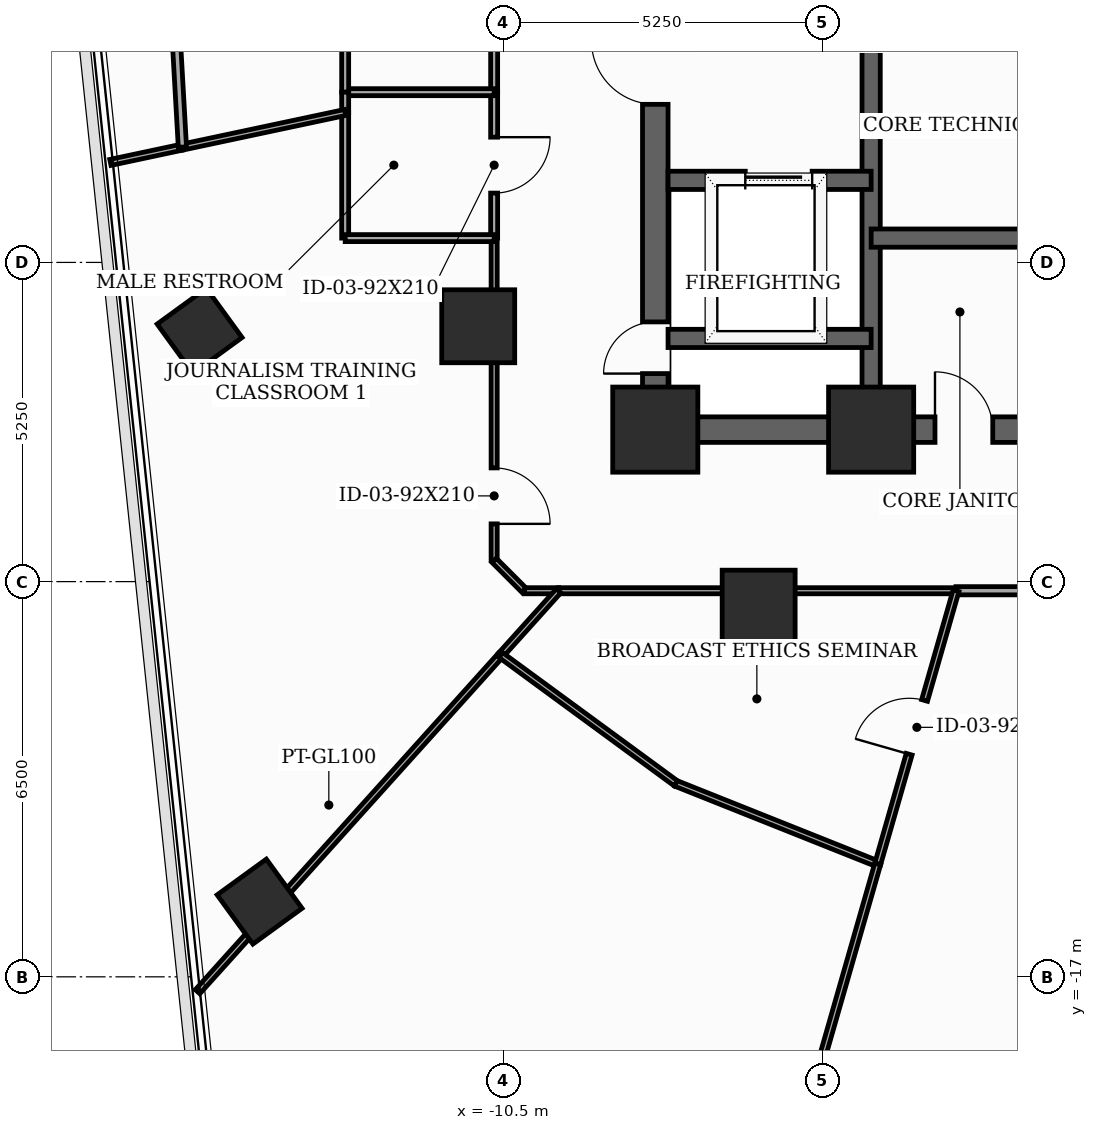
"""IFC4 building model, lengths in metres.
Left out: names, types, materials, properties, quantities, classifications, styles, units other than length and angle.
Written with IfcOpenShell. Run it as: python <this file> out.ifc"""

import sys

from ifc_helpers import new_model, si_unit, direction, frame, frame_2d, origin, origin_2d, place, context, subcontext, project, spatial, rectangle, extrude, element, fill, save


model = new_model("IFC4")
c1 = context("Model", 3, precision=1e-05, world=origin(), true_north=direction((0.0, 1.0)))
c2 = subcontext(c1, "Body", "Model", "MODEL_VIEW")
j1 = project(units=[si_unit("LENGTHUNIT", "METRE"), si_unit("PLANEANGLEUNIT", "RADIAN")], contexts=[c1])
p1 = place(None, origin())
s1 = spatial("IfcSite", under=j1, at=p1, CompositionType="ELEMENT")
p2 = place(p1, origin())
s2 = spatial("IfcBuilding", under=s1, at=p2, CompositionType="ELEMENT")
p3 = place(p2, frame((0.0, 0.0, 173.1)))
s3 = spatial("IfcBuildingStorey", under=s2, at=p3, CompositionType="ELEMENT", Elevation=173.1)
for number, where, z_axis, x_axis in (
    (1, (-8.0, -8.0, 0.0), (0.0, 0.0, 1.0), (1.0, 0.0, 0.0)),
    (2, (-4.45, -8.0, 0.0), (0.0, 0.0, 1.0), (1.0, 0.0, 0.0)),
):
    element("IfcColumn", number, at=place(p3, frame(where, z_axis=z_axis, x_axis=x_axis)), inside=s3, PredefinedType="COLUMN", context=c2, shape_type="SweptSolid", body=[
        extrude(rectangle(XDim=1.4, YDim=1.4, at=origin_2d()), origin(), (0.0, 0.0, 1.0), 3.7),
    ])
for number, where, z_axis, x_axis in (
    (3, (-10.912, -6.3, 0.0), (0.0, 0.0, 1.0), (1.0, 0.0, 0.0)),
    (4, (-6.3, -10.912, 0.0), (0.0, 0.0, 1.0), (1.0, 0.0, 0.0)),
):
    element("IfcColumn", number, at=place(p3, frame(where, z_axis=z_axis, x_axis=x_axis)), inside=s3, PredefinedType="COLUMN", context=c2, shape_type="SweptSolid", body=[
        extrude(rectangle(XDim=1.2, YDim=1.2, at=origin_2d()), origin(), (0.0, 0.0, 1.0), 3.7),
    ])
for number, where, z_axis, x_axis in (
    (5, (-15.494, -6.375, 0.0), (0.0, 0.0, 1.0), (0.809, 0.588, 0.0)),
    (6, (-14.507, -15.763, 0.0), (0.0, 0.0, 1.0), (0.809, 0.588, 0.0)),
):
    element("IfcColumn", number, at=place(p3, frame(where, z_axis=z_axis, x_axis=x_axis)), inside=s3, PredefinedType="COLUMN", context=c2, shape_type="SweptSolid", body=[
        extrude(rectangle(XDim=1.0, YDim=1.0, at=origin_2d()), origin(), (0.0, 0.0, 1.0), 3.7),
    ])
p4 = place(p3, frame((-8.0, -8.0, 0.0), z_axis=(0.0, 0.0, 1.0), x_axis=(0.0, 1.0, 0.0)))
e7 = element("IfcWall", 7, at=p4, inside=s3, PredefinedType="SHEAR", context=c2, shape_type="SweptSolid", body=[
    extrude(rectangle(XDim=16.0, YDim=0.42, at=frame_2d((8.0, 0.0))), origin(), (0.0, 0.0, 1.0), 3.5),
])
p5 = place(p4, frame((0.922, 0.0, 0.0)))
e8 = element("IfcOpeningElement", 8, at=p5, cuts=e7, PredefinedType="OPENING", context=c2, shape_type="SweptSolid", body=[
    extrude(rectangle(XDim=0.85, YDim=2.02, at=frame_2d((0.425, 1.01))), frame((0.0, 0.22, 0.0), z_axis=(0.0, -1.0, 0.0), x_axis=(1.0, 0.0, 0.0)), (0.0, 0.0, 1.0), 0.44),
])
p6 = place(p4, frame((5.35, 0.0, 0.0)))
e9 = element("IfcOpeningElement", 9, at=p6, cuts=e7, PredefinedType="OPENING", context=c2, shape_type="SweptSolid", body=[
    extrude(rectangle(XDim=1.05, YDim=2.15, at=frame_2d((0.525, 1.075))), frame((0.0, 0.22, 0.0), z_axis=(0.0, -1.0, 0.0), x_axis=(1.0, 0.0, 0.0)), (0.0, 0.0, 1.0), 0.44),
])
p7 = place(p3, frame((-8.0, -8.0, 0.0), z_axis=(0.0, 0.0, 1.0), x_axis=(1.0, 0.0, 0.0)))
e10 = element("IfcWall", 10, at=p7, inside=s3, PredefinedType="SHEAR", context=c2, shape_type="SweptSolid", body=[
    extrude(rectangle(XDim=16.0, YDim=0.42, at=frame_2d((8.0, 0.0))), origin(), (0.0, 0.0, 1.0), 3.5),
])
p8 = place(p7, frame((4.6, 0.0, 0.0)))
e11 = element("IfcOpeningElement", 11, at=p8, cuts=e10, PredefinedType="OPENING", context=c2, shape_type="SweptSolid", body=[
    extrude(rectangle(XDim=0.95, YDim=2.1, at=frame_2d((0.475, 1.05))), frame((0.0, 0.22, 0.0), z_axis=(0.0, -1.0, 0.0), x_axis=(1.0, 0.0, 0.0)), (0.0, 0.0, 1.0), 0.44),
])
p9 = place(p7, frame((7.52, 0.0, 0.0)))
e12 = element("IfcOpeningElement", 12, at=p9, cuts=e10, PredefinedType="OPENING", context=c2, shape_type="SweptSolid", body=[
    extrude(rectangle(XDim=0.95, YDim=2.1, at=frame_2d((0.475, 1.05))), frame((0.0, 0.22, 0.0), z_axis=(0.0, -1.0, 0.0), x_axis=(1.0, 0.0, 0.0)), (0.0, 0.0, 1.0), 0.44),
])
p10 = place(p7, frame((10.45, 0.0, 0.0)))
e13 = element("IfcOpeningElement", 13, at=p10, cuts=e10, PredefinedType="OPENING", context=c2, shape_type="SweptSolid", body=[
    extrude(rectangle(XDim=0.95, YDim=2.1, at=frame_2d((0.475, 1.05))), frame((0.0, 0.22, 0.0), z_axis=(0.0, -1.0, 0.0), x_axis=(1.0, 0.0, 0.0)), (0.0, 0.0, 1.0), 0.44),
])
p11 = place(p3, frame((-4.45, -7.79, 0.0), z_axis=(0.0, 0.0, 1.0), x_axis=(0.0, 1.0, 0.0)))
e14 = element("IfcWall", 14, at=p11, inside=s3, PredefinedType="SHEAR", context=c2, shape_type="SweptSolid", body=[
    extrude(rectangle(XDim=15.58, YDim=0.3, at=frame_2d((7.79, 0.0))), origin(), (0.0, 0.0, 1.0), 3.5),
])
p12 = place(p3, frame((-7.79, -3.9, 0.0), z_axis=(0.0, 0.0, 1.0), x_axis=(1.0, 0.0, 0.0)))
e15 = element("IfcWall", 15, at=p12, inside=s3, PredefinedType="SHEAR", context=c2, shape_type="SweptSolid", body=[
    extrude(rectangle(XDim=3.34, YDim=0.3, at=frame_2d((1.67, 0.0))), origin(), (0.0, 0.0, 1.0), 3.5),
])
p13 = place(p12, frame((1.27, 0.0, 0.0)))
e16 = element("IfcOpeningElement", 16, at=p13, cuts=e15, PredefinedType="OPENING", context=c2, shape_type="SweptSolid", body=[
    extrude(rectangle(XDim=1.1, YDim=2.1, at=frame_2d((0.55, 1.05))), frame((0.0, 0.16, 0.0), z_axis=(0.0, -1.0, 0.0), x_axis=(1.0, 0.0, 0.0)), (0.0, 0.0, 1.0), 0.32),
])
p14 = place(p3, frame((-7.79, -6.5, 0.0), z_axis=(0.0, 0.0, 1.0), x_axis=(1.0, 0.0, 0.0)))
e17 = element("IfcWall", 17, at=p14, inside=s3, PredefinedType="SHEAR", context=c2, shape_type="SweptSolid", body=[
    extrude(rectangle(XDim=3.34, YDim=0.3, at=frame_2d((1.67, 0.0))), origin(), (0.0, 0.0, 1.0), 3.5),
])
p15 = place(p3, frame((-4.45, -4.85, 0.0), z_axis=(0.0, 0.0, 1.0), x_axis=(1.0, 0.0, 0.0)))
e18 = element("IfcWall", 18, at=p15, inside=s3, PredefinedType="SHEAR", context=c2, shape_type="SweptSolid", body=[
    extrude(rectangle(XDim=8.9, YDim=0.3, at=frame_2d((4.45, 0.0))), origin(), (0.0, 0.0, 1.0), 3.5),
])
p16 = place(p3, frame((-10.65, 0.0, 0.0), z_axis=(0.0, 0.0, 1.0), x_axis=(0.0, -1.0, 0.0)))
e19 = element("IfcWall", 19, at=p16, inside=s3, PredefinedType="PARTITIONING", context=c2, shape_type="SweptSolid", body=[
    extrude(rectangle(XDim=2.45, YDim=0.115, at=frame_2d((1.225, 0.0))), origin(), (0.0, 0.0, 1.0), 2.885),
])
p17 = place(p16, frame((0.765, 0.0, 0.0)))
e20 = element("IfcOpeningElement", 20, at=p17, cuts=e19, PredefinedType="OPENING", context=c2, shape_type="SweptSolid", body=[
    extrude(rectangle(XDim=0.92, YDim=2.1, at=frame_2d((0.46, 1.05))), frame((0.0, 0.067, 0.0), z_axis=(0.0, -1.0, 0.0), x_axis=(1.0, 0.0, 0.0)), (0.0, 0.0, 1.0), 0.135),
])
p18 = place(p3, frame((-10.65, -2.45, 0.0), z_axis=(0.0, 0.0, 1.0), x_axis=(0.0, -1.0, 0.0)))
e21 = element("IfcWall", 21, at=p18, inside=s3, PredefinedType="PARTITIONING", context=c2, shape_type="SweptSolid", body=[
    extrude(rectangle(XDim=2.4, YDim=0.115, at=frame_2d((1.2, 0.0))), origin(), (0.0, 0.0, 1.0), 3.5),
])
p19 = place(p18, frame((0.74, 0.0, 0.0)))
e22 = element("IfcOpeningElement", 22, at=p19, cuts=e21, PredefinedType="OPENING", context=c2, shape_type="SweptSolid", body=[
    extrude(rectangle(XDim=0.92, YDim=2.1, at=frame_2d((0.46, 1.05))), frame((0.0, 0.067, 0.0), z_axis=(0.0, -1.0, 0.0), x_axis=(1.0, 0.0, 0.0)), (0.0, 0.0, 1.0), 0.135),
])
p20 = place(p3, frame((-10.65, -4.85, 0.0), z_axis=(0.0, 0.0, 1.0), x_axis=(0.0, -1.0, 0.0)))
e23 = element("IfcWall", 23, at=p20, inside=s3, PredefinedType="MOVABLE", context=c2, shape_type="SweptSolid", body=[
    extrude(rectangle(XDim=5.3, YDim=0.1, at=frame_2d((2.65, 0.0))), origin(), (0.0, 0.0, 1.0), 2.885),
])
p21 = place(p20, frame((3.78, 0.0, 0.0)))
e24 = element("IfcOpeningElement", 24, at=p21, cuts=e23, PredefinedType="OPENING", context=c2, shape_type="SweptSolid", body=[
    extrude(rectangle(XDim=0.92, YDim=2.1, at=frame_2d((0.46, 1.05))), frame((0.0, 0.06, 0.0), z_axis=(0.0, -1.0, 0.0), x_axis=(1.0, 0.0, 0.0)), (0.0, 0.0, 1.0), 0.12),
])
p22 = place(p3, frame((-10.65, -10.15, 0.0), z_axis=(0.0, 0.0, 1.0), x_axis=(0.707106781187, -0.707106781187, 0.0)))
e25 = element("IfcWall", 25, at=p22, inside=s3, PredefinedType="MOVABLE", context=c2, shape_type="SweptSolid", body=[
    extrude(rectangle(XDim=0.707, YDim=0.1, at=frame_2d((0.354, 0.0))), origin(), (0.0, 0.0, 1.0), 3.5),
])
p23 = place(p3, frame((-10.15, -10.65, 0.0), z_axis=(0.0, 0.0, 1.0), x_axis=(1.0, 0.0, 0.0)))
e26 = element("IfcWall", 26, at=p23, inside=s3, PredefinedType="MOVABLE", context=c2, shape_type="SweptSolid", body=[
    extrude(rectangle(XDim=0.561, YDim=0.1, at=frame_2d((0.28, 0.0))), origin(), (0.0, 0.0, 1.0), 3.5),
])
p24 = place(p3, frame((-9.589, -10.65, 0.0), z_axis=(0.0, 0.0, 1.0), x_axis=(1.0, 0.0, 0.0)))
e27 = element("IfcWall", 27, at=p24, inside=s3, PredefinedType="MOVABLE", context=c2, shape_type="SweptSolid", body=[
    extrude(rectangle(XDim=6.535, YDim=0.1, at=frame_2d((3.268, 0.0))), origin(), (0.0, 0.0, 1.0), 2.885),
])
p25 = place(p3, frame((-3.054, -10.65, 0.0), z_axis=(0.0, 0.0, 1.0), x_axis=(1.0, 0.0, 0.0)))
e28 = element("IfcWall", 28, at=p25, inside=s3, PredefinedType="PARTITIONING", context=c2, shape_type="SweptSolid", body=[
    extrude(rectangle(XDim=10.792, YDim=0.135, at=frame_2d((5.396, 0.0))), origin(), (0.0, 0.0, 1.0), 2.885),
])
p26 = place(p25, frame((4.596, 0.0, 0.0)))
e29 = element("IfcOpeningElement", 29, at=p26, cuts=e28, PredefinedType="OPENING", context=c2, shape_type="SweptSolid", body=[
    extrude(rectangle(XDim=1.6, YDim=2.15, at=frame_2d((0.8, 1.075))), frame((0.0, 0.077, 0.0), z_axis=(0.0, -1.0, 0.0), x_axis=(1.0, 0.0, 0.0)), (0.0, 0.0, 1.0), 0.155),
])
p27 = place(p3, frame((-13.1, -2.45, 0.0), z_axis=(0.0, 0.0, 1.0), x_axis=(1.0, 0.0, 0.0)))
e30 = element("IfcWall", 30, at=p27, inside=s3, PredefinedType="PARTITIONING", context=c2, shape_type="SweptSolid", body=[
    extrude(rectangle(XDim=2.45, YDim=0.115, at=frame_2d((1.225, 0.0))), origin(), (0.0, 0.0, 1.0), 2.885),
])
p28 = place(p3, frame((-13.1, 0.0, 0.0), z_axis=(0.0, 0.0, 1.0), x_axis=(0.0, -1.0, 0.0)))
e31 = element("IfcWall", 31, at=p28, inside=s3, PredefinedType="PARTITIONING", context=c2, shape_type="SweptSolid", body=[
    extrude(rectangle(XDim=2.45, YDim=0.115, at=frame_2d((1.225, 0.0))), origin(), (0.0, 0.0, 1.0), 3.5),
])
p29 = place(p3, frame((-13.1, -2.784, 0.0), z_axis=(0.0, 0.0, 1.0), x_axis=(0.0, -1.0, 0.0)))
e32 = element("IfcWall", 32, at=p29, inside=s3, PredefinedType="PARTITIONING", context=c2, shape_type="SweptSolid", body=[
    extrude(rectangle(XDim=2.066, YDim=0.115, at=frame_2d((1.033, 0.0))), origin(), (0.0, 0.0, 1.0), 3.5),
])
p30 = place(p3, frame((-13.1, -4.85, 0.0), z_axis=(0.0, 0.0, 1.0), x_axis=(1.0, 0.0, 0.0)))
e33 = element("IfcWall", 33, at=p30, inside=s3, PredefinedType="PARTITIONING", context=c2, shape_type="SweptSolid", body=[
    extrude(rectangle(XDim=2.45, YDim=0.115, at=frame_2d((1.225, 0.0))), origin(), (0.0, 0.0, 1.0), 2.885),
])
p31 = place(p3, frame((-13.1, -2.45, 0.0), z_axis=(0.0, 0.0, 1.0), x_axis=(0.0, -1.0, 0.0)))
e34 = element("IfcWall", 34, at=p31, inside=s3, PredefinedType="PARTITIONING", context=c2, shape_type="SweptSolid", body=[
    extrude(rectangle(XDim=0.334, YDim=0.115, at=frame_2d((0.167, 0.0))), origin(), (0.0, 0.0, 1.0), 3.5),
])
p32 = place(p3, frame((-10.541, -11.707, 0.0), z_axis=(0.0, 0.0, 1.0), x_axis=(0.669154347467, 0.743123448201, 0.0)))
e35 = element("IfcWall", 35, at=p32, inside=s3, PredefinedType="MOVABLE", context=c2, shape_type="SweptSolid", body=[
    extrude(rectangle(XDim=1.423, YDim=0.1, at=frame_2d((0.711, 0.0))), origin(), (0.0, 0.0, 1.0), 3.5),
])
p33 = place(p3, frame((-15.528, -17.245, 0.0), z_axis=(0.0, 0.0, 1.0), x_axis=(0.669169234172, 0.74311004302, 0.0)))
e36 = element("IfcWall", 36, at=p33, inside=s3, PredefinedType="MOVABLE", context=c2, shape_type="SweptSolid", body=[
    extrude(rectangle(XDim=7.452, YDim=0.1, at=frame_2d((3.726, 0.0))), origin(), (0.0, 0.0, 1.0), 2.885),
])
p34 = place(p3, frame((-15.777, -3.353, 0.0), z_axis=(0.0, 0.0, 1.0), x_axis=(-0.978029023755, -0.208468771503, 0.0)))
e37 = element("IfcWall", 37, at=p34, inside=s3, PredefinedType="MOVABLE", context=c2, shape_type="SweptSolid", body=[
    extrude(rectangle(XDim=1.211, YDim=0.1, at=frame_2d((0.605, 0.0))), origin(), (0.0, 0.0, 1.0), 2.985),
])
p35 = place(p3, frame((-13.1, -2.784, 0.0), z_axis=(0.0, 0.0, 1.0), x_axis=(-0.978141843994, -0.207938772307, 0.0)))
e38 = element("IfcWall", 38, at=p35, inside=s3, PredefinedType="MOVABLE", context=c2, shape_type="SweptSolid", body=[
    extrude(rectangle(XDim=2.737, YDim=0.1, at=frame_2d((1.368, 0.0))), origin(), (0.0, 0.0, 1.0), 2.985),
])
p36 = place(p3, frame((-10.541, -11.707, 0.0), z_axis=(0.0, 0.0, 1.0), x_axis=(0.806504929698, -0.591227366055, 0.0)))
e39 = element("IfcWall", 39, at=p36, inside=s3, PredefinedType="MOVABLE", context=c2, shape_type="SweptSolid", body=[
    extrude(rectangle(XDim=3.572, YDim=0.1, at=frame_2d((1.786, 0.0))), origin(), (0.0, 0.0, 1.0), 2.885),
])
p37 = place(p3, frame((-7.66, -13.819, 0.0), z_axis=(0.0, 0.0, 1.0), x_axis=(0.928782740603, -0.37062463593, 0.0)))
e40 = element("IfcWall", 40, at=p37, inside=s3, PredefinedType="MOVABLE", context=c2, shape_type="SweptSolid", body=[
    extrude(rectangle(XDim=3.572, YDim=0.1, at=frame_2d((1.786, 0.0))), origin(), (0.0, 0.0, 1.0), 3.5),
])
p38 = place(p3, frame((-4.342, -15.143, 0.0), z_axis=(0.0, 0.0, 1.0), x_axis=(0.275576442642, 0.961279160422, 0.0)))
e41 = element("IfcWall", 41, at=p38, inside=s3, PredefinedType="MOVABLE", context=c2, shape_type="SweptSolid", body=[
    extrude(rectangle(XDim=4.674, YDim=0.1, at=frame_2d((2.337, 0.0))), origin(), (0.0, 0.0, 1.0), 2.885),
])
p39 = place(p38, frame((1.877, 0.0, 0.0)))
e42 = element("IfcOpeningElement", 42, at=p39, cuts=e41, PredefinedType="OPENING", context=c2, shape_type="SweptSolid", body=[
    extrude(rectangle(XDim=0.92, YDim=2.1, at=frame_2d((0.46, 1.05))), frame((0.0, 0.06, 0.0), z_axis=(0.0, -1.0, 0.0), x_axis=(1.0, 0.0, 0.0)), (0.0, 0.0, 1.0), 0.12),
])
p40 = place(p3, frame((-7.721, -26.926, 0.0), z_axis=(0.0, 0.0, 1.0), x_axis=(0.275633812082, 0.961262712081, 0.0)))
e43 = element("IfcWall", 43, at=p40, inside=s3, PredefinedType="MOVABLE", context=c2, shape_type="SweptSolid", body=[
    extrude(rectangle(XDim=12.258, YDim=0.1, at=frame_2d((6.129, 0.0))), origin(), (0.0, 0.0, 1.0), 2.985),
])
p41 = place(p40, frame((5.669, 0.0, 0.0)))
e44 = element("IfcOpeningElement", 44, at=p41, cuts=e43, PredefinedType="OPENING", context=c2, shape_type="SweptSolid", body=[
    extrude(rectangle(XDim=0.92, YDim=2.1, at=frame_2d((0.46, 1.05))), frame((0.0, 0.06, 0.0), z_axis=(0.0, -1.0, 0.0), x_axis=(1.0, 0.0, 0.0)), (0.0, 0.0, 1.0), 0.12),
])
p42 = place(p3, frame((-15.777, -3.353, 0.0), z_axis=(0.0, 0.0, 1.0), x_axis=(-0.056600228811, 0.99839692212, 0.0)))
e45 = element("IfcWall", 45, at=p42, inside=s3, PredefinedType="PARTITIONING", context=c2, shape_type="SweptSolid", body=[
    extrude(rectangle(XDim=5.336, YDim=0.135, at=frame_2d((2.668, 0.0))), origin(), (0.0, 0.0, 1.0), 2.985),
])
p43 = place(p5, origin())
e46 = element("IfcDoor", 46, at=p43, inside=s3, OperationType="SINGLE_SWING_LEFT", PredefinedType="TRAPDOOR", context=c2, shape_type="SweptSolid", body=[
    extrude(rectangle(XDim=0.85, YDim=2.02, at=frame_2d((0.425, 1.01))), frame((0.0, 0.025, 0.0), z_axis=(0.0, -1.0, 0.0), x_axis=(1.0, 0.0, 0.0)), (0.0, 0.0, 1.0), 0.05),
])
fill(e8, e46)
p44 = place(p6, origin())
e47 = element("IfcDoor", 47, at=p44, inside=s3, OperationType="SINGLE_SWING_RIGHT", PredefinedType="DOOR", context=c2, shape_type="SweptSolid", body=[
    extrude(rectangle(XDim=1.05, YDim=2.15, at=frame_2d((0.525, 1.075))), frame((0.0, 0.025, 0.0), z_axis=(0.0, -1.0, 0.0), x_axis=(1.0, 0.0, 0.0)), (0.0, 0.0, 1.0), 0.05),
])
fill(e9, e47)
p45 = place(p8, origin())
e48 = element("IfcDoor", 48, at=p45, inside=s3, OperationType="SINGLE_SWING_LEFT", PredefinedType="DOOR", context=c2, shape_type="SweptSolid", body=[
    extrude(rectangle(XDim=0.95, YDim=2.1, at=frame_2d((0.475, 1.05))), frame((0.0, 0.025, 0.0), z_axis=(0.0, -1.0, 0.0), x_axis=(1.0, 0.0, 0.0)), (0.0, 0.0, 1.0), 0.05),
])
fill(e11, e48)
p46 = place(p13, origin())
e49 = element("IfcDoor", 49, at=p46, inside=s3, OperationType="SLIDING_TO_LEFT", PredefinedType="DOOR", context=c2, shape_type="SweptSolid", body=[
    extrude(rectangle(XDim=1.1, YDim=2.1, at=frame_2d((0.55, 1.05))), frame((0.0, 0.025, 0.0), z_axis=(0.0, -1.0, 0.0), x_axis=(1.0, 0.0, 0.0)), (0.0, 0.0, 1.0), 0.05),
])
fill(e16, e49)
p47 = place(p19, origin())
e50 = element("IfcDoor", 50, at=p47, inside=s3, OperationType="SINGLE_SWING_LEFT", PredefinedType="DOOR", context=c2, shape_type="SweptSolid", body=[
    extrude(rectangle(XDim=0.92, YDim=2.1, at=frame_2d((0.46, 1.05))), frame((0.0, 0.025, 0.0), z_axis=(0.0, -1.0, 0.0), x_axis=(1.0, 0.0, 0.0)), (0.0, 0.0, 1.0), 0.05),
])
fill(e22, e50)
p48 = place(p21, origin())
e51 = element("IfcDoor", 51, at=p48, inside=s3, OperationType="SINGLE_SWING_RIGHT", PredefinedType="DOOR", context=c2, shape_type="SweptSolid", body=[
    extrude(rectangle(XDim=0.92, YDim=2.1, at=frame_2d((0.46, 1.05))), frame((0.0, 0.025, 0.0), z_axis=(0.0, -1.0, 0.0), x_axis=(1.0, 0.0, 0.0)), (0.0, 0.0, 1.0), 0.05),
])
fill(e24, e51)
p49 = place(p39, origin())
e52 = element("IfcDoor", 52, at=p49, inside=s3, OperationType="SINGLE_SWING_LEFT", PredefinedType="DOOR", context=c2, shape_type="SweptSolid", body=[
    extrude(rectangle(XDim=0.92, YDim=2.1, at=frame_2d((0.46, 1.05))), frame((0.0, 0.025, 0.0), z_axis=(0.0, -1.0, 0.0), x_axis=(1.0, 0.0, 0.0)), (0.0, 0.0, 1.0), 0.05),
])
fill(e42, e52)
save(model, sys.argv[1])
